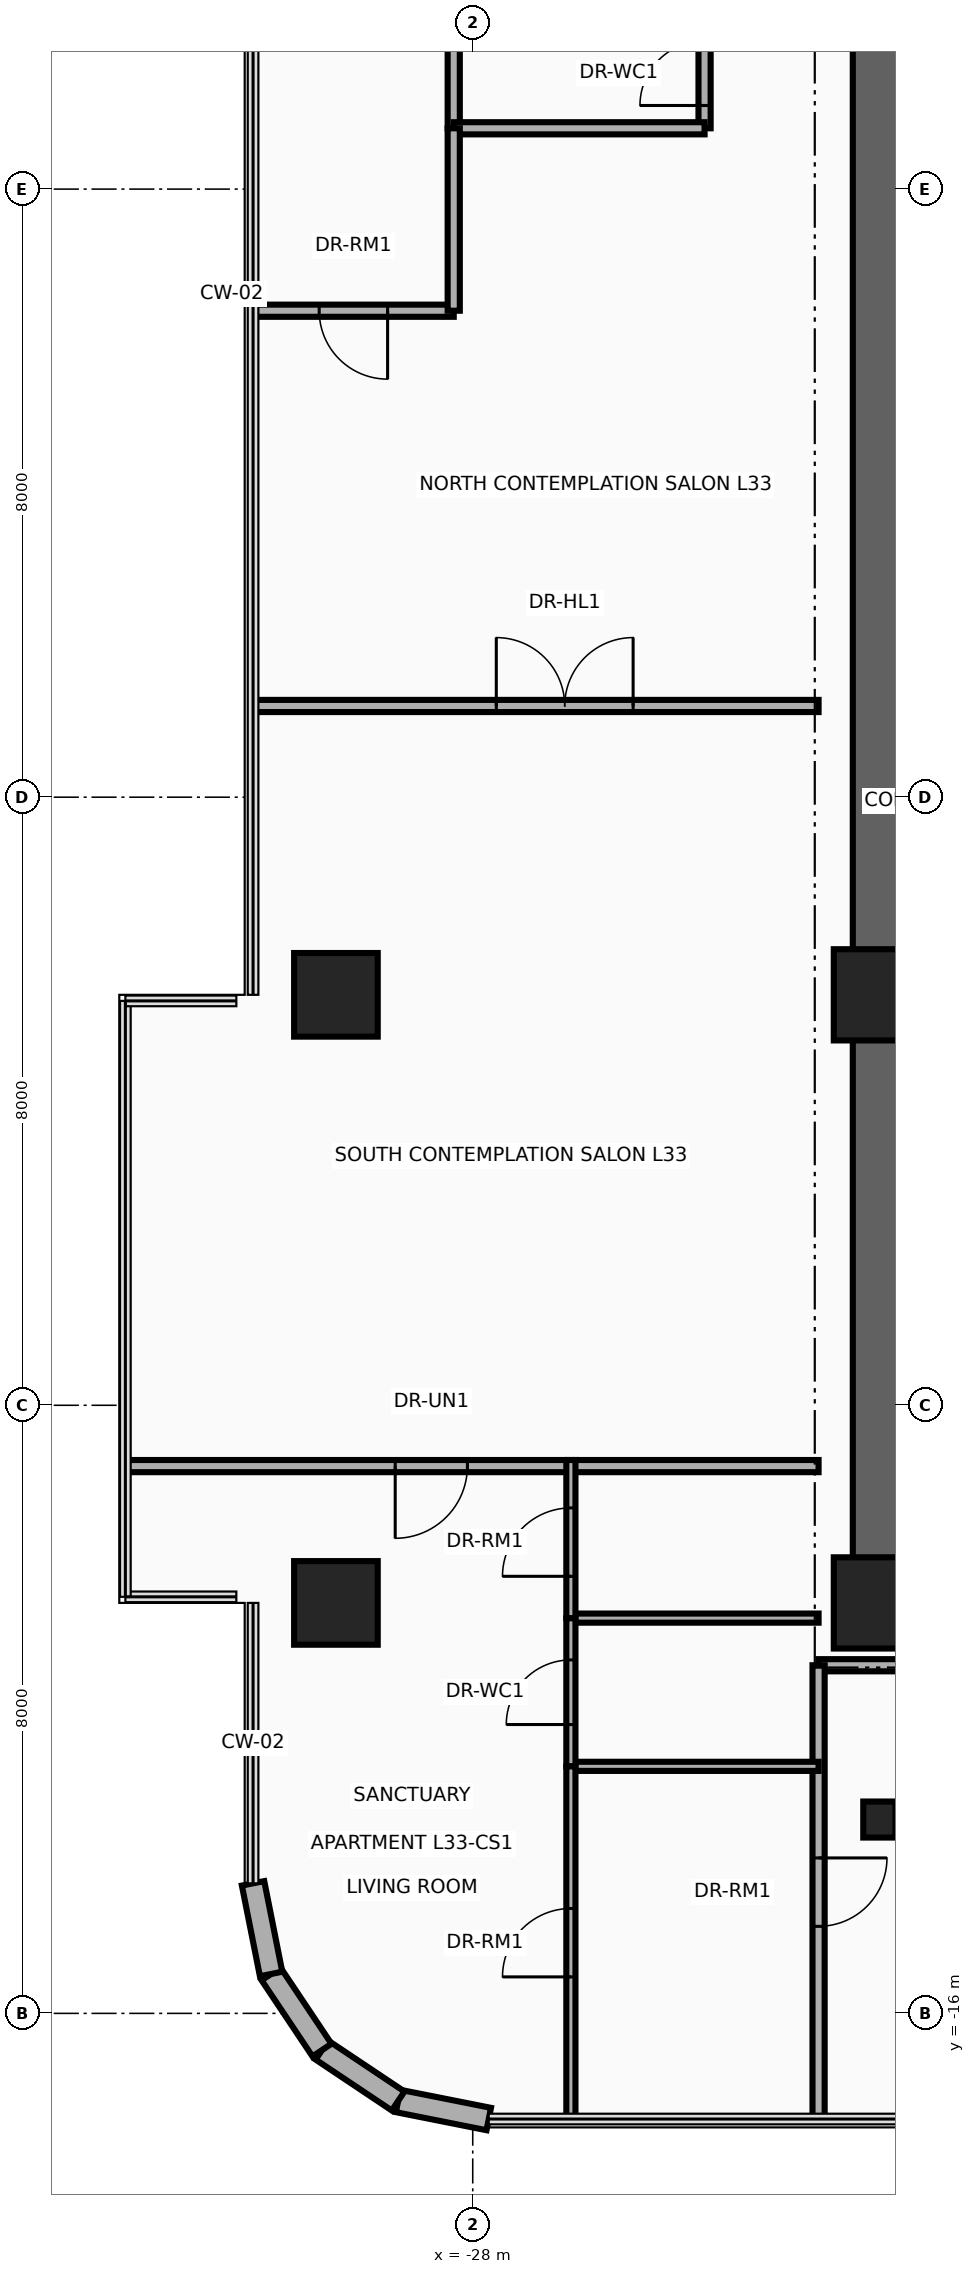
"""IFC4 building model, lengths in metres.
Left out: names, types, materials, properties, quantities, classifications, styles, units other than length and angle.
Written with IfcOpenShell. Run it as: python <this file> out.ifc"""

import sys

from ifc_helpers import new_model, si_unit, direction, frame, frame_2d, origin, origin_2d, place, context, subcontext, project, spatial, rectangle, circle, i_section, extrude, source, transform, mapped, element, fill, save


model = new_model("IFC4")
c1 = context("Model", 3, precision=1e-05, world=origin(), true_north=direction((0.0, 1.0)))
c2 = subcontext(c1, "Body", "Model", "MODEL_VIEW")
j1 = project(units=[si_unit("LENGTHUNIT", "METRE"), si_unit("PLANEANGLEUNIT", "RADIAN")], contexts=[c1])
p1 = place(None, origin())
s1 = spatial("IfcSite", under=j1, at=p1, CompositionType="ELEMENT")
p2 = place(p1, origin())
s2 = spatial("IfcBuilding", under=s1, at=p2, CompositionType="ELEMENT")
p3 = place(p2, frame((0.0, 0.0, 131.6)))
s3 = spatial("IfcBuildingStorey", under=s2, at=p3, CompositionType="ELEMENT", Elevation=131.6)
p4 = place(p3, frame((-22.65, -11.15, 0.0), z_axis=(0.0, 0.0, 1.0), x_axis=(0.0, 1.0, 0.0)))
e1 = element("IfcWall", 1, at=p4, inside=s3, PredefinedType="SHEAR", context=c2, shape_type="SweptSolid", body=[
    extrude(rectangle(XDim=22.3, YDim=0.7, at=frame_2d((11.15, 0.0))), origin(), (0.0, 0.0, 1.0), 3.46),
])
p5 = place(p3, frame((-22.65, -10.8, 0.0), z_axis=(0.0, 0.0, 1.0), x_axis=(1.0, 0.0, 0.0)))
e2 = element("IfcWall", 2, at=p5, inside=s3, PredefinedType="SHEAR", context=c2, shape_type="SweptSolid", body=[
    extrude(rectangle(XDim=10.25, YDim=0.7, at=frame_2d((5.125, 0.0))), origin(), (0.0, 0.0, 1.0), 3.46),
])
m1 = source(origin(), c2, "Body", "SweptSolid", [
    extrude(circle(Radius=0.55, at=origin_2d()), origin(), (0.0, 0.0, 1.0), 3.7),
])
p6 = place(p3, frame((-29.8, -10.6, 0.0), z_axis=(0.0, 0.0, 1.0), x_axis=(1.0, 0.0, 0.0)))
e3 = element("IfcColumn", 3, at=p6, inside=s3, PredefinedType="COLUMN", context=c2, shape_type="MappedRepresentation", body=[
    mapped(m1, transform((0.0, 0.0, 0.0), x_axis=(1.0, 0.0, 0.0), y_axis=(0.0, 1.0, 0.0), z_axis=(0.0, 0.0, 1.0), scale=1.0)),
])
m2 = source(origin(), c2, "Body", "SweptSolid", [
    extrude(rectangle(XDim=1.2, YDim=1.2, at=origin_2d()), origin(), (0.0, 0.0, 1.0), 3.7),
])
p7 = place(p3, frame((-22.65, -10.6, 0.0), z_axis=(0.0, 0.0, 1.0), x_axis=(1.0, 0.0, 0.0)))
e4 = element("IfcColumn", 4, at=p7, inside=s3, PredefinedType="COLUMN", context=c2, shape_type="MappedRepresentation", body=[
    mapped(m2, transform((0.0, 0.0, 0.0), x_axis=(1.0, 0.0, 0.0), y_axis=(0.0, 1.0, 0.0), z_axis=(0.0, 0.0, 1.0), scale=1.0)),
])
p8 = place(p3, frame((-29.8, -2.6, 0.0), z_axis=(0.0, 0.0, 1.0), x_axis=(1.0, 0.0, 0.0)))
e5 = element("IfcColumn", 5, at=p8, inside=s3, PredefinedType="COLUMN", context=c2, shape_type="MappedRepresentation", body=[
    mapped(m1, transform((0.0, 0.0, 0.0), x_axis=(1.0, 0.0, 0.0), y_axis=(0.0, 1.0, 0.0), z_axis=(0.0, 0.0, 1.0), scale=1.0)),
])
p9 = place(p3, frame((-22.65, -2.6, 0.0), z_axis=(0.0, 0.0, 1.0), x_axis=(1.0, 0.0, 0.0)))
e6 = element("IfcColumn", 6, at=p9, inside=s3, PredefinedType="COLUMN", context=c2, shape_type="MappedRepresentation", body=[
    mapped(m2, transform((0.0, 0.0, 0.0), x_axis=(1.0, 0.0, 0.0), y_axis=(0.0, 1.0, 0.0), z_axis=(0.0, 0.0, 1.0), scale=1.0)),
])
m3 = source(origin(), c2, "Body", "SweptSolid", [
    extrude(i_section(OverallWidth=0.424, OverallDepth=0.474, WebThickness=0.048, FlangeThickness=0.077, at=origin_2d()), origin(), (0.0, 0.0, 1.0), 3.7),
])
p10 = place(p3, frame((-22.65, -13.45, 0.0), z_axis=(0.0, 0.0, 1.0), x_axis=(1.0, 0.0, 0.0)))
e7 = element("IfcColumn", 7, at=p10, inside=s3, PredefinedType="COLUMN", context=c2, shape_type="MappedRepresentation", body=[
    mapped(m3, transform((0.0, 0.0, 0.0), x_axis=(1.0, 0.0, 0.0), y_axis=(0.0, 1.0, 0.0), z_axis=(0.0, 0.0, 1.0), scale=1.0)),
])
p11 = place(p3, frame((-27.789, -17.39, 0.0), z_axis=(0.0, 0.0, 1.0), x_axis=(-0.980804027463, 0.194996050505, 0.0)))
e8 = element("IfcWall", 8, at=p11, inside=s3, PredefinedType="SOLIDWALL", context=c2, shape_type="SweptSolid", body=[
    extrude(rectangle(XDim=1.216, YDim=0.3, at=frame_2d((0.608, 0.0))), origin(), (0.0, 0.0, 1.0), 3.46),
])
for number, where, z_axis, x_axis in (
    (9, (-28.982, -17.153, 0.0), (0.0, 0.0, 1.0), (-0.831, 0.556, 0.0)),
    (10, (-29.983, -16.483, 0.0), (0.0, 0.0, 1.0), (-0.556, 0.831, 0.0)),
):
    element("IfcWall", number, at=place(p3, frame(where, z_axis=z_axis, x_axis=x_axis)), inside=s3, PredefinedType="SOLIDWALL", context=c2, shape_type="SweptSolid", body=[
        extrude(rectangle(XDim=1.205, YDim=0.3, at=frame_2d((0.603, 0.0))), origin(), (0.0, 0.0, 1.0), 3.46),
    ])
p12 = place(p3, frame((-30.653, -15.482, 0.0), z_axis=(0.0, 0.0, 1.0), x_axis=(-0.194996050505, 0.980804027463, 0.0)))
e11 = element("IfcWall", 11, at=p12, inside=s3, PredefinedType="SOLIDWALL", context=c2, shape_type="SweptSolid", body=[
    extrude(rectangle(XDim=1.216, YDim=0.3, at=frame_2d((0.608, 0.0))), origin(), (0.0, 0.0, 1.0), 3.46),
])
p13 = place(p3, frame((-28.25, 8.8, 0.0), z_axis=(0.0, 0.0, 1.0), x_axis=(0.0, 1.0, 0.0)))
e12 = element("IfcWall", 12, at=p13, inside=s3, PredefinedType="PARTITIONING", context=c2, shape_type="SweptSolid", body=[
    extrude(rectangle(XDim=2.6, YDim=0.16, at=frame_2d((1.3, 0.0))), origin(), (0.0, 0.0, 1.0), 2.666),
])
p14 = place(p3, frame((-24.95, 8.8, 0.0), z_axis=(0.0, 0.0, 1.0), x_axis=(0.0, 1.0, 0.0)))
e13 = element("IfcWall", 13, at=p14, inside=s3, PredefinedType="PARTITIONING", context=c2, shape_type="SweptSolid", body=[
    extrude(rectangle(XDim=2.6, YDim=0.16, at=frame_2d((1.3, 0.0))), origin(), (0.0, 0.0, 1.0), 2.666),
])
p15 = place(p14, frame((0.3, 0.0, 0.0)))
e14 = element("IfcOpeningElement", 14, at=p15, cuts=e13, PredefinedType="OPENING", context=c2, shape_type="SweptSolid", body=[
    extrude(rectangle(XDim=0.85, YDim=2.1, at=frame_2d((0.425, 1.05))), frame((0.0, 0.095, 0.0), z_axis=(0.0, -1.0, 0.0), x_axis=(1.0, 0.0, 0.0)), (0.0, 0.0, 1.0), 0.19),
])
p16 = place(p14, frame((1.45, 0.0, 0.0)))
e15 = element("IfcOpeningElement", 15, at=p16, cuts=e13, PredefinedType="OPENING", context=c2, shape_type="SweptSolid", body=[
    extrude(rectangle(XDim=0.85, YDim=2.1, at=frame_2d((0.425, 1.05))), frame((0.0, 0.095, 0.0), z_axis=(0.0, -1.0, 0.0), x_axis=(1.0, 0.0, 0.0)), (0.0, 0.0, 1.0), 0.19),
])
p17 = place(p3, frame((-28.25, 8.8, 0.0), z_axis=(0.0, 0.0, 1.0), x_axis=(1.0, 0.0, 0.0)))
e16 = element("IfcWall", 16, at=p17, inside=s3, PredefinedType="PARTITIONING", context=c2, shape_type="SweptSolid", body=[
    extrude(rectangle(XDim=3.3, YDim=0.16, at=frame_2d((1.65, 0.0))), origin(), (0.0, 0.0, 1.0), 3.46),
])
p18 = place(p3, frame((-23.45, -11.42, 0.0), z_axis=(0.0, 0.0, 1.0), x_axis=(1.0, 0.0, 0.0)))
e17 = element("IfcWall", 17, at=p18, inside=s3, PredefinedType="PARTITIONING", context=c2, shape_type="SweptSolid", body=[
    extrude(rectangle(XDim=13.84, YDim=0.16, at=frame_2d((6.92, 0.0))), origin(), (0.0, 0.0, 1.0), 2.834),
])
p19 = place(p3, frame((-23.45, -17.39, 0.0), z_axis=(0.0, 0.0, 1.0), x_axis=(0.0, 1.0, 0.0)))
e18 = element("IfcWall", 18, at=p19, inside=s3, PredefinedType="PARTITIONING", context=c2, shape_type="SweptSolid", body=[
    extrude(rectangle(XDim=5.97, YDim=0.16, at=frame_2d((2.985, 0.0))), origin(), (0.0, 0.0, 1.0), 3.46),
])
p20 = place(p19, frame((2.535, 0.0, 0.0)))
e19 = element("IfcOpeningElement", 19, at=p20, cuts=e18, PredefinedType="OPENING", context=c2, shape_type="SweptSolid", body=[
    extrude(rectangle(XDim=0.9, YDim=2.1, at=frame_2d((0.45, 1.05))), frame((0.0, 0.095, 0.0), z_axis=(0.0, -1.0, 0.0), x_axis=(1.0, 0.0, 0.0)), (0.0, 0.0, 1.0), 0.19),
])
p21 = place(p3, frame((-32.54, -8.8, 0.0), z_axis=(0.0, 0.0, 1.0), x_axis=(1.0, 0.0, 0.0)))
e20 = element("IfcWall", 20, at=p21, inside=s3, PredefinedType="PARTITIONING", context=c2, shape_type="SweptSolid", body=[
    extrude(rectangle(XDim=9.09, YDim=0.16, at=frame_2d((4.545, 0.0))), origin(), (0.0, 0.0, 1.0), 2.896),
])
p22 = place(p21, frame((3.52, 0.0, 0.0)))
e21 = element("IfcOpeningElement", 21, at=p22, cuts=e20, PredefinedType="OPENING", context=c2, shape_type="SweptSolid", body=[
    extrude(rectangle(XDim=0.95, YDim=2.15, at=frame_2d((0.475, 1.075))), frame((0.0, 0.095, 0.0), z_axis=(0.0, -1.0, 0.0), x_axis=(1.0, 0.0, 0.0)), (0.0, 0.0, 1.0), 0.19),
])
p23 = place(p3, frame((-30.89, 6.4, 0.0), z_axis=(0.0, 0.0, 1.0), x_axis=(1.0, 0.0, 0.0)))
e22 = element("IfcWall", 22, at=p23, inside=s3, PredefinedType="PARTITIONING", context=c2, shape_type="SweptSolid", body=[
    extrude(rectangle(XDim=2.64, YDim=0.16, at=frame_2d((1.32, 0.0))), origin(), (0.0, 0.0, 1.0), 2.896),
])
p24 = place(p23, frame((0.87, 0.0, 0.0)))
e23 = element("IfcOpeningElement", 23, at=p24, cuts=e22, PredefinedType="OPENING", context=c2, shape_type="SweptSolid", body=[
    extrude(rectangle(XDim=0.9, YDim=2.1, at=frame_2d((0.45, 1.05))), frame((0.0, 0.095, 0.0), z_axis=(0.0, -1.0, 0.0), x_axis=(1.0, 0.0, 0.0)), (0.0, 0.0, 1.0), 0.19),
])
p25 = place(p3, frame((-28.25, 6.4, 0.0), z_axis=(0.0, 0.0, 1.0), x_axis=(0.0, 1.0, 0.0)))
e24 = element("IfcWall", 24, at=p25, inside=s3, PredefinedType="PARTITIONING", context=c2, shape_type="SweptSolid", body=[
    extrude(rectangle(XDim=2.4, YDim=0.16, at=frame_2d((1.2, 0.0))), origin(), (0.0, 0.0, 1.0), 2.988),
])
p26 = place(p3, frame((-26.708, -10.8, 0.0), z_axis=(0.0, 0.0, 1.0), x_axis=(1.0, 0.0, 0.0)))
e25 = element("IfcWall", 25, at=p26, inside=s3, PredefinedType="PARTITIONING", context=c2, shape_type="SweptSolid", body=[
    extrude(rectangle(XDim=3.259, YDim=0.12, at=frame_2d((1.629, 0.0))), origin(), (0.0, 0.0, 1.0), 2.666),
])
p27 = place(p3, frame((-26.708, -12.75, 0.0), z_axis=(0.0, 0.0, 1.0), x_axis=(1.0, 0.0, 0.0)))
e26 = element("IfcWall", 26, at=p27, inside=s3, PredefinedType="PARTITIONING", context=c2, shape_type="SweptSolid", body=[
    extrude(rectangle(XDim=3.259, YDim=0.12, at=frame_2d((1.629, 0.0))), origin(), (0.0, 0.0, 1.0), 3.46),
])
p28 = place(p3, frame((-26.708, -12.75, 0.0), z_axis=(0.0, 0.0, 1.0), x_axis=(0.0, 1.0, 0.0)))
e27 = element("IfcWall", 27, at=p28, inside=s3, PredefinedType="PARTITIONING", context=c2, shape_type="SweptSolid", body=[
    extrude(rectangle(XDim=1.95, YDim=0.12, at=frame_2d((0.975, 0.0))), origin(), (0.0, 0.0, 1.0), 2.666),
])
p29 = place(p28, frame((0.55, 0.0, 0.0)))
e28 = element("IfcOpeningElement", 28, at=p29, cuts=e27, PredefinedType="OPENING", context=c2, shape_type="SweptSolid", body=[
    extrude(rectangle(XDim=0.85, YDim=2.1, at=frame_2d((0.425, 1.05))), frame((0.0, 0.075, 0.0), z_axis=(0.0, -1.0, 0.0), x_axis=(1.0, 0.0, 0.0)), (0.0, 0.0, 1.0), 0.15),
])
p30 = place(p3, frame((-26.708, -10.8, 0.0), z_axis=(0.0, 0.0, 1.0), x_axis=(0.0, 1.0, 0.0)))
e29 = element("IfcWall", 29, at=p30, inside=s3, PredefinedType="PARTITIONING", context=c2, shape_type="SweptSolid", body=[
    extrude(rectangle(XDim=2.08, YDim=0.12, at=frame_2d((1.04, 0.0))), origin(), (0.0, 0.0, 1.0), 2.666),
])
p31 = place(p30, frame((0.55, 0.0, 0.0)))
e30 = element("IfcOpeningElement", 30, at=p31, cuts=e29, PredefinedType="OPENING", context=c2, shape_type="SweptSolid", body=[
    extrude(rectangle(XDim=0.9, YDim=2.1, at=frame_2d((0.45, 1.05))), frame((0.0, 0.075, 0.0), z_axis=(0.0, -1.0, 0.0), x_axis=(1.0, 0.0, 0.0)), (0.0, 0.0, 1.0), 0.15),
])
p32 = place(p3, frame((-26.708, -17.39, 0.0), z_axis=(0.0, 0.0, 1.0), x_axis=(0.0, 1.0, 0.0)))
e31 = element("IfcWall", 31, at=p32, inside=s3, PredefinedType="PARTITIONING", context=c2, shape_type="SweptSolid", body=[
    extrude(rectangle(XDim=4.64, YDim=0.12, at=frame_2d((2.32, 0.0))), origin(), (0.0, 0.0, 1.0), 3.46),
])
p33 = place(p32, frame((1.87, 0.0, 0.0)))
e32 = element("IfcOpeningElement", 32, at=p33, cuts=e31, PredefinedType="OPENING", context=c2, shape_type="SweptSolid", body=[
    extrude(rectangle(XDim=0.9, YDim=2.1, at=frame_2d((0.45, 1.05))), frame((0.0, 0.075, 0.0), z_axis=(0.0, -1.0, 0.0), x_axis=(1.0, 0.0, 0.0)), (0.0, 0.0, 1.0), 0.15),
])
p34 = place(p3, frame((-30.89, 1.2, 0.0), z_axis=(0.0, 0.0, 1.0), x_axis=(1.0, 0.0, 0.0)))
e33 = element("IfcWall", 33, at=p34, inside=s3, PredefinedType="PARTITIONING", context=c2, shape_type="SweptSolid", body=[
    extrude(rectangle(XDim=7.44, YDim=0.16, at=frame_2d((3.72, 0.0))), origin(), (0.0, 0.0, 1.0), 2.896),
])
p35 = place(p34, frame((3.2, 0.0, 0.0)))
e34 = element("IfcOpeningElement", 34, at=p35, cuts=e33, PredefinedType="OPENING", context=c2, shape_type="SweptSolid", body=[
    extrude(rectangle(XDim=1.8, YDim=2.15, at=frame_2d((0.9, 1.075))), frame((0.0, 0.095, 0.0), z_axis=(0.0, -1.0, 0.0), x_axis=(1.0, 0.0, 0.0)), (0.0, 0.0, 1.0), 0.19),
])
p36 = place(p15, origin())
e35 = element("IfcDoor", 35, at=p36, inside=s3, OperationType="SINGLE_SWING_LEFT", PredefinedType="DOOR", context=c2, shape_type="SweptSolid", body=[
    extrude(rectangle(XDim=0.85, YDim=2.1, at=frame_2d((0.425, 1.05))), frame((0.0, 0.025, 0.0), z_axis=(0.0, -1.0, 0.0), x_axis=(1.0, 0.0, 0.0)), (0.0, 0.0, 1.0), 0.05),
])
fill(e14, e35)
p37 = place(p22, frame((0.95, 0.0, 0.0), z_axis=(0.0, 0.0, 1.0), x_axis=(-1.0, 0.0, 0.0)))
e36 = element("IfcDoor", 36, at=p37, inside=s3, OperationType="SINGLE_SWING_LEFT", PredefinedType="DOOR", context=c2, shape_type="SweptSolid", body=[
    extrude(rectangle(XDim=0.95, YDim=2.15, at=frame_2d((0.475, 1.075))), frame((0.0, 0.025, 0.0), z_axis=(0.0, -1.0, 0.0), x_axis=(1.0, 0.0, 0.0)), (0.0, 0.0, 1.0), 0.05),
])
fill(e21, e36)
p38 = place(p29, origin())
e37 = element("IfcDoor", 37, at=p38, inside=s3, OperationType="SINGLE_SWING_RIGHT", PredefinedType="DOOR", context=c2, shape_type="SweptSolid", body=[
    extrude(rectangle(XDim=0.85, YDim=2.1, at=frame_2d((0.425, 1.05))), frame((0.0, 0.025, 0.0), z_axis=(0.0, -1.0, 0.0), x_axis=(1.0, 0.0, 0.0)), (0.0, 0.0, 1.0), 0.05),
])
fill(e28, e37)
p39 = place(p31, origin())
e38 = element("IfcDoor", 38, at=p39, inside=s3, OperationType="SINGLE_SWING_LEFT", PredefinedType="DOOR", context=c2, shape_type="SweptSolid", body=[
    extrude(rectangle(XDim=0.9, YDim=2.1, at=frame_2d((0.45, 1.05))), frame((0.0, 0.025, 0.0), z_axis=(0.0, -1.0, 0.0), x_axis=(1.0, 0.0, 0.0)), (0.0, 0.0, 1.0), 0.05),
])
fill(e30, e38)
p40 = place(p33, origin())
e39 = element("IfcDoor", 39, at=p40, inside=s3, OperationType="SINGLE_SWING_RIGHT", PredefinedType="DOOR", context=c2, shape_type="SweptSolid", body=[
    extrude(rectangle(XDim=0.9, YDim=2.1, at=frame_2d((0.45, 1.05))), frame((0.0, 0.025, 0.0), z_axis=(0.0, -1.0, 0.0), x_axis=(1.0, 0.0, 0.0)), (0.0, 0.0, 1.0), 0.05),
])
fill(e32, e39)
p41 = place(p24, frame((0.9, 0.0, 0.0), z_axis=(0.0, 0.0, 1.0), x_axis=(-1.0, 0.0, 0.0)))
e40 = element("IfcDoor", 40, at=p41, inside=s3, OperationType="SINGLE_SWING_LEFT", PredefinedType="DOOR", context=c2, shape_type="SweptSolid", body=[
    extrude(rectangle(XDim=0.9, YDim=2.1, at=frame_2d((0.45, 1.05))), frame((0.0, 0.025, 0.0), z_axis=(0.0, -1.0, 0.0), x_axis=(1.0, 0.0, 0.0)), (0.0, 0.0, 1.0), 0.05),
])
fill(e23, e40)
p42 = place(p35, origin())
e41 = element("IfcDoor", 41, at=p42, inside=s3, OperationType="DOUBLE_DOOR_SINGLE_SWING", PredefinedType="DOOR", context=c2, shape_type="SweptSolid", body=[
    extrude(rectangle(XDim=1.8, YDim=2.15, at=frame_2d((0.9, 1.075))), frame((0.0, 0.025, 0.0), z_axis=(0.0, -1.0, 0.0), x_axis=(1.0, 0.0, 0.0)), (0.0, 0.0, 1.0), 0.05),
])
fill(e34, e41)
p43 = place(p20, frame((0.9, 0.0, 0.0), z_axis=(0.0, 0.0, 1.0), x_axis=(-1.0, 0.0, 0.0)))
e42 = element("IfcDoor", 42, at=p43, inside=s3, OperationType="SINGLE_SWING_LEFT", PredefinedType="DOOR", context=c2, shape_type="SweptSolid", body=[
    extrude(rectangle(XDim=0.9, YDim=2.1, at=frame_2d((0.45, 1.05))), frame((0.0, 0.025, 0.0), z_axis=(0.0, -1.0, 0.0), x_axis=(1.0, 0.0, 0.0)), (0.0, 0.0, 1.0), 0.05),
])
fill(e19, e42)
save(model, sys.argv[1])
